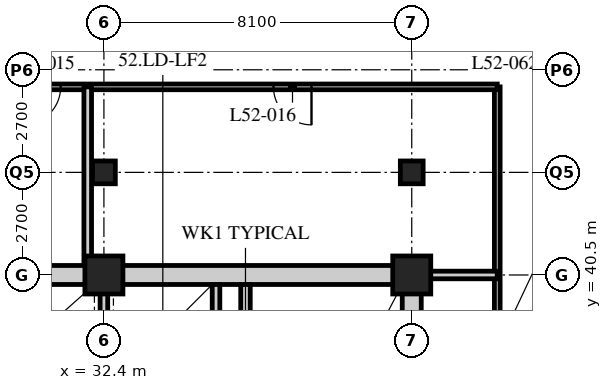
"""IFC4 building model, lengths in metres.
Left out: names, types, materials, properties, quantities, classifications, styles, units other than length and angle.
Written with IfcOpenShell. Run it as: python <this file> out.ifc"""

import sys

from ifc_helpers import new_model, si_unit, direction, frame, frame_2d, origin, origin_2d, place, context, subcontext, project, spatial, rectangle, hollow_rectangle, extrude, element, fill, save


model = new_model("IFC4")
c1 = context("Model", 3, precision=1e-05, world=origin(), true_north=direction((0.0, 1.0)))
c2 = subcontext(c1, "Body", "Model", "MODEL_VIEW")
j1 = project(units=[si_unit("LENGTHUNIT", "METRE"), si_unit("PLANEANGLEUNIT", "RADIAN")], contexts=[c1])
p1 = place(None, origin())
s1 = spatial("IfcSite", under=j1, at=p1, CompositionType="ELEMENT")
p2 = place(p1, origin())
s2 = spatial("IfcBuilding", under=s1, at=p2, CompositionType="ELEMENT")
p3 = place(p2, frame((0.0, 0.0, 202.8)))
s3 = spatial("IfcBuildingStorey", under=s2, at=p3, CompositionType="ELEMENT", Elevation=202.8)
p4 = place(p3, frame((32.4, 40.5, 0.0), z_axis=(0.0, 0.0, 1.0), x_axis=(1.0, 0.0, 0.0)))
e1 = element("IfcColumn", 1, at=p4, inside=s3, PredefinedType="COLUMN", context=c2, shape_type="SweptSolid", body=[
    extrude(hollow_rectangle(XDim=1.0, YDim=1.0, WallThickness=0.1, at=origin_2d()), origin(), (0.0, 0.0, 1.0), 3.6),
])
p5 = place(p3, frame((32.4, 43.2, 0.0), z_axis=(0.0, 0.0, 1.0), x_axis=(1.0, 0.0, 0.0)))
e2 = element("IfcColumn", 2, at=p5, inside=s3, PredefinedType="COLUMN", context=c2, shape_type="SweptSolid", body=[
    extrude(hollow_rectangle(XDim=0.6, YDim=0.6, WallThickness=0.05, at=origin_2d()), origin(), (0.0, 0.0, 1.0), 3.6),
])
p6 = place(p3, frame((40.5, 40.5, 0.0), z_axis=(0.0, 0.0, 1.0), x_axis=(1.0, 0.0, 0.0)))
e3 = element("IfcColumn", 3, at=p6, inside=s3, PredefinedType="COLUMN", context=c2, shape_type="SweptSolid", body=[
    extrude(hollow_rectangle(XDim=1.0, YDim=1.0, WallThickness=0.1, at=origin_2d()), origin(), (0.0, 0.0, 1.0), 3.6),
])
p7 = place(p3, frame((40.5, 43.2, 0.0), z_axis=(0.0, 0.0, 1.0), x_axis=(1.0, 0.0, 0.0)))
e4 = element("IfcColumn", 4, at=p7, inside=s3, PredefinedType="COLUMN", context=c2, shape_type="SweptSolid", body=[
    extrude(hollow_rectangle(XDim=0.6, YDim=0.6, WallThickness=0.05, at=origin_2d()), origin(), (0.0, 0.0, 1.0), 3.6),
])
p8 = place(p3, frame((42.75, 20.7, 0.0), z_axis=(0.0, 0.0, 1.0), x_axis=(0.0, 1.0, 0.0)))
e5 = element("IfcWall", 5, at=p8, inside=s3, PredefinedType="PARTITIONING", context=c2, shape_type="SweptSolid", body=[
    extrude(rectangle(XDim=24.75, YDim=0.15, at=frame_2d((12.375, 0.0))), origin(), (0.0, 0.0, 1.0), 3.39),
])
p9 = place(p8, frame((7.15, 0.0, 0.0)))
e6 = element("IfcOpeningElement", 6, at=p9, cuts=e5, PredefinedType="OPENING", context=c2, shape_type="SweptSolid", body=[
    extrude(rectangle(XDim=1.0, YDim=2.1, at=frame_2d((0.5, 1.05))), frame((0.0, 0.085, 0.0), z_axis=(0.0, -1.0, 0.0), x_axis=(1.0, 0.0, 0.0)), (0.0, 0.0, 1.0), 0.17),
])
p10 = place(p8, frame((15.25, 0.0, 0.0)))
e7 = element("IfcOpeningElement", 7, at=p10, cuts=e5, PredefinedType="OPENING", context=c2, shape_type="SweptSolid", body=[
    extrude(rectangle(XDim=1.0, YDim=2.1, at=frame_2d((0.5, 1.05))), frame((0.0, 0.085, 0.0), z_axis=(0.0, -1.0, 0.0), x_axis=(1.0, 0.0, 0.0)), (0.0, 0.0, 1.0), 0.17),
])
p11 = place(p3, frame((42.75, 45.45, 0.0), z_axis=(0.0, 0.0, 1.0), x_axis=(-1.0, 0.0, 0.0)))
e8 = element("IfcWall", 8, at=p11, inside=s3, PredefinedType="PARTITIONING", context=c2, shape_type="SweptSolid", body=[
    extrude(rectangle(XDim=13.19, YDim=0.15, at=frame_2d((6.595, 0.0))), origin(), (0.0, 0.0, 1.0), 3.39),
])
p12 = place(p11, frame((11.488, 0.0, 0.0)))
e9 = element("IfcOpeningElement", 9, at=p12, cuts=e8, PredefinedType="OPENING", context=c2, shape_type="SweptSolid", body=[
    extrude(rectangle(XDim=1.0, YDim=2.1, at=frame_2d((0.5, 1.05))), frame((0.0, 0.085, 0.0), z_axis=(0.0, -1.0, 0.0), x_axis=(1.0, 0.0, 0.0)), (0.0, 0.0, 1.0), 0.17),
])
p13 = place(p11, frame((4.888, 0.0, 0.0)))
e10 = element("IfcOpeningElement", 10, at=p13, cuts=e8, PredefinedType="OPENING", context=c2, shape_type="SweptSolid", body=[
    extrude(rectangle(XDim=1.0, YDim=2.1, at=frame_2d((0.5, 1.05))), frame((0.0, 0.085, 0.0), z_axis=(0.0, -1.0, 0.0), x_axis=(1.0, 0.0, 0.0)), (0.0, 0.0, 1.0), 0.17),
])
p14 = place(p3, frame((31.974, 45.45, 0.0), z_axis=(0.0, 0.0, 1.0), x_axis=(0.0, -1.0, 0.0)))
e11 = element("IfcWall", 11, at=p14, inside=s3, PredefinedType="SOLIDWALL", context=c2, shape_type="SweptSolid", body=[
    extrude(rectangle(XDim=4.95, YDim=0.2, at=frame_2d((2.475, 0.0))), origin(), (0.0, 0.0, 1.0), 2.69),
])
p15 = place(p3, frame((40.5, 40.5, 0.0), z_axis=(0.0, 0.0, 1.0), x_axis=(1.0, 0.0, 0.0)))
e12 = element("IfcWall", 12, at=p15, inside=s3, PredefinedType="SOLIDWALL", context=c2, shape_type="SweptSolid", body=[
    extrude(rectangle(XDim=2.25, YDim=0.2, at=frame_2d((1.125, 0.0))), origin(), (0.0, 0.0, 1.0), 3.39),
])
p16 = place(p3, frame((15.95, 40.5, 0.0), z_axis=(0.0, 0.0, 1.0), x_axis=(1.0, 0.0, 0.0)))
e13 = element("IfcWall", 13, at=p16, inside=s3, PredefinedType="SOLIDWALL", context=c2, shape_type="SweptSolid", body=[
    extrude(rectangle(XDim=24.8, YDim=0.5, at=frame_2d((12.4, 0.0))), origin(), (0.0, 0.0, 1.0), 2.74),
])
p17 = place(p16, frame((11.5, 0.0, 0.0)))
e14 = element("IfcOpeningElement", 14, at=p17, cuts=e13, PredefinedType="OPENING", context=c2, shape_type="SweptSolid", body=[
    extrude(rectangle(XDim=1.8, YDim=2.4, at=frame_2d((0.9, 1.2))), frame((0.0, 0.26, 0.0), z_axis=(0.0, -1.0, 0.0), x_axis=(1.0, 0.0, 0.0)), (0.0, 0.0, 1.0), 0.52),
])
p18 = place(p3, frame((40.5, 24.55, 0.0), z_axis=(0.0, 0.0, 1.0), x_axis=(0.0, 1.0, 0.0)))
e15 = element("IfcWall", 15, at=p18, inside=s3, PredefinedType="SOLIDWALL", context=c2, shape_type="SweptSolid", body=[
    extrude(rectangle(XDim=15.7, YDim=0.5, at=frame_2d((7.85, 0.0))), origin(), (0.0, 0.0, 1.0), 2.778),
])
p19 = place(p3, frame((32.4, 32.5, 0.0), z_axis=(0.0, 0.0, 1.0), x_axis=(0.0, 1.0, 0.0)))
e16 = element("IfcWall", 16, at=p19, inside=s3, PredefinedType="SOLIDWALL", context=c2, shape_type="SweptSolid", body=[
    extrude(rectangle(XDim=7.75, YDim=0.2, at=frame_2d((3.875, 0.0))), origin(), (0.0, 0.0, 1.0), 2.778),
])
p20 = place(p19, frame((1.9, 0.0, 0.0)))
e17 = element("IfcOpeningElement", 17, at=p20, cuts=e16, PredefinedType="OPENING", context=c2, shape_type="SweptSolid", body=[
    extrude(rectangle(XDim=1.2, YDim=2.1, at=frame_2d((0.6, 1.05))), frame((0.0, 0.11, 0.0), z_axis=(0.0, -1.0, 0.0), x_axis=(1.0, 0.0, 0.0)), (0.0, 0.0, 1.0), 0.22),
])
p21 = place(p3, frame((36.125, 32.5, 0.0), z_axis=(0.0, 0.0, 1.0), x_axis=(0.0, 1.0, 0.0)))
e18 = element("IfcWall", 18, at=p21, inside=s3, PredefinedType="SOLIDWALL", context=c2, shape_type="SweptSolid", body=[
    extrude(rectangle(XDim=7.75, YDim=0.25, at=frame_2d((3.875, 0.0))), origin(), (0.0, 0.0, 1.0), 3.39),
])
p22 = place(p21, frame((0.45, 0.0, 0.0)))
e19 = element("IfcOpeningElement", 19, at=p22, cuts=e18, PredefinedType="OPENING", context=c2, shape_type="SweptSolid", body=[
    extrude(rectangle(XDim=1.2, YDim=2.1, at=frame_2d((0.6, 1.05))), frame((0.0, 0.135, 0.0), z_axis=(0.0, -1.0, 0.0), x_axis=(1.0, 0.0, 0.0)), (0.0, 0.0, 1.0), 0.27),
])
p23 = place(p3, frame((35.35, 37.65, 0.0), z_axis=(0.0, 0.0, 1.0), x_axis=(0.0, 1.0, 0.0)))
e20 = element("IfcWall", 20, at=p23, inside=s3, PredefinedType="SOLIDWALL", context=c2, shape_type="SweptSolid", body=[
    extrude(rectangle(XDim=2.6, YDim=0.2, at=frame_2d((1.3, 0.0))), origin(), (0.0, 0.0, 1.0), 3.39),
])
p24 = place(p12, origin())
e21 = element("IfcDoor", 21, at=p24, inside=s3, OperationType="SINGLE_SWING_RIGHT", PredefinedType="DOOR", context=c2, shape_type="SweptSolid", body=[
    extrude(rectangle(XDim=1.0, YDim=2.1, at=frame_2d((0.5, 1.05))), frame((0.0, 0.025, 0.0), z_axis=(0.0, -1.0, 0.0), x_axis=(1.0, 0.0, 0.0)), (0.0, 0.0, 1.0), 0.05),
])
fill(e9, e21)
p25 = place(p13, origin())
e22 = element("IfcDoor", 22, at=p25, inside=s3, OperationType="SINGLE_SWING_LEFT", PredefinedType="DOOR", context=c2, shape_type="SweptSolid", body=[
    extrude(rectangle(XDim=1.0, YDim=2.1, at=frame_2d((0.5, 1.05))), frame((0.0, 0.025, 0.0), z_axis=(0.0, -1.0, 0.0), x_axis=(1.0, 0.0, 0.0)), (0.0, 0.0, 1.0), 0.05),
])
fill(e10, e22)
save(model, sys.argv[1])
